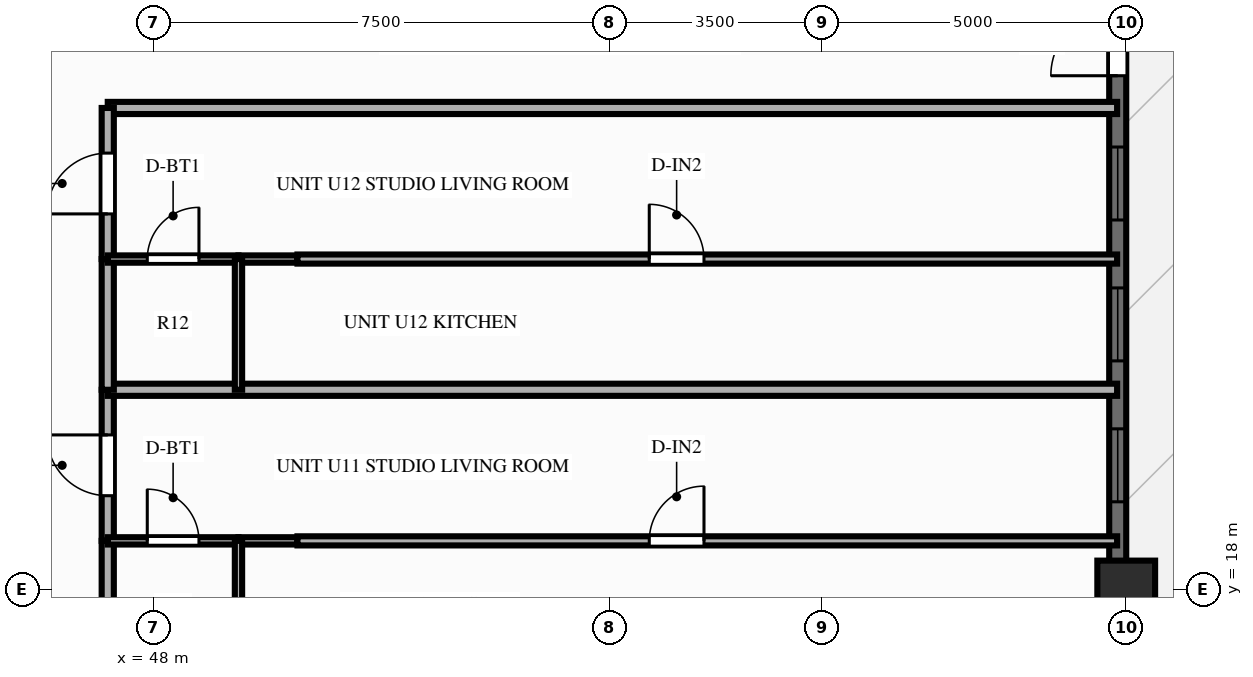
"""IFC4 building model, lengths in metres.
Left out: names, types, materials, properties, quantities, classifications, styles, units other than length and angle.
Written with IfcOpenShell. Run it as: python <this file> out.ifc"""

import sys

from ifc_helpers import new_model, si_unit, direction, frame, frame_2d, origin, origin_2d, place, context, subcontext, project, spatial, rectangle, extrude, source, transform, mapped, element, fill, save


model = new_model("IFC4")
c1 = context("Model", 3, precision=1e-05, world=origin(), true_north=direction((0.0, 1.0)))
c2 = subcontext(c1, "Body", "Model", "MODEL_VIEW")
j1 = project(units=[si_unit("LENGTHUNIT", "METRE"), si_unit("PLANEANGLEUNIT", "RADIAN")], contexts=[c1])
p1 = place(None, origin())
s1 = spatial("IfcSite", under=j1, at=p1, CompositionType="ELEMENT")
p2 = place(p1, origin())
s2 = spatial("IfcBuilding", under=s1, at=p2, CompositionType="ELEMENT")
p3 = place(p2, frame((0.0, 0.0, 122.85)))
s3 = spatial("IfcBuildingStorey", under=s2, at=p3, CompositionType="ELEMENT", Elevation=122.85)
m1 = source(origin(), c2, "Body", "SweptSolid", [
    extrude(rectangle(XDim=0.95, YDim=0.95, at=origin_2d()), origin(), (0.0, 0.0, 1.0), 3.9),
])
p4 = place(p3, frame((64.0, 18.0, 0.0), z_axis=(0.0, 0.0, 1.0), x_axis=(1.0, 0.0, 0.0)))
e1 = element("IfcColumn", 1, at=p4, inside=s3, PredefinedType="COLUMN", context=c2, shape_type="MappedRepresentation", body=[
    mapped(m1, transform((0.0, 0.0, 0.0), scale=1.0)),
])
p5 = place(p3, frame((63.86, 7.2, 0.0), z_axis=(0.0, 0.0, 1.0), x_axis=(0.0, 1.0, 0.0)))
e2 = element("IfcWall", 2, at=p5, inside=s3, PredefinedType="SOLIDWALL", context=c2, shape_type="SweptSolid", body=[
    extrude(rectangle(XDim=39.6, YDim=0.28, at=frame_2d((19.8, 0.0))), origin(), (0.0, 0.0, 1.0), 2.24),
])
p6 = place(p5, frame((0.89, 0.0, 0.25)))
e3 = element("IfcOpeningElement", 3, at=p6, cuts=e2, PredefinedType="OPENING", context=c2, shape_type="SweptSolid", body=[
    extrude(rectangle(XDim=1.2, YDim=1.5, at=frame_2d((0.6, 0.75))), frame((0.0, 0.152, 0.0), z_axis=(0.0, -1.0, 0.0), x_axis=(1.0, 0.0, 0.0)), (0.0, 0.0, 1.0), 0.304),
])
p7 = place(p5, frame((3.14, 0.0, 0.25)))
e4 = element("IfcOpeningElement", 4, at=p7, cuts=e2, PredefinedType="OPENING", context=c2, shape_type="SweptSolid", body=[
    extrude(rectangle(XDim=1.2, YDim=1.5, at=frame_2d((0.6, 0.75))), frame((0.0, 0.152, 0.0), z_axis=(0.0, -1.0, 0.0), x_axis=(1.0, 0.0, 0.0)), (0.0, 0.0, 1.0), 0.304),
])
p8 = place(p5, frame((5.458, 0.0, 0.25)))
e5 = element("IfcOpeningElement", 5, at=p8, cuts=e2, PredefinedType="OPENING", context=c2, shape_type="SweptSolid", body=[
    extrude(rectangle(XDim=1.2, YDim=1.5, at=frame_2d((0.6, 0.75))), frame((0.0, 0.152, 0.0), z_axis=(0.0, -1.0, 0.0), x_axis=(1.0, 0.0, 0.0)), (0.0, 0.0, 1.0), 0.304),
])
p9 = place(p5, frame((7.775, 0.0, 0.25)))
e6 = element("IfcOpeningElement", 6, at=p9, cuts=e2, PredefinedType="OPENING", context=c2, shape_type="SweptSolid", body=[
    extrude(rectangle(XDim=1.2, YDim=1.5, at=frame_2d((0.6, 0.75))), frame((0.0, 0.152, 0.0), z_axis=(0.0, -1.0, 0.0), x_axis=(1.0, 0.0, 0.0)), (0.0, 0.0, 1.0), 0.304),
])
p10 = place(p5, frame((12.242, 0.0, 0.25)))
e7 = element("IfcOpeningElement", 7, at=p10, cuts=e2, PredefinedType="OPENING", context=c2, shape_type="SweptSolid", body=[
    extrude(rectangle(XDim=1.2, YDim=1.5, at=frame_2d((0.6, 0.75))), frame((0.0, 0.152, 0.0), z_axis=(0.0, -1.0, 0.0), x_axis=(1.0, 0.0, 0.0)), (0.0, 0.0, 1.0), 0.304),
])
p11 = place(p5, frame((14.56, 0.0, 0.25)))
e8 = element("IfcOpeningElement", 8, at=p11, cuts=e2, PredefinedType="OPENING", context=c2, shape_type="SweptSolid", body=[
    extrude(rectangle(XDim=1.2, YDim=1.5, at=frame_2d((0.6, 0.75))), frame((0.0, 0.152, 0.0), z_axis=(0.0, -1.0, 0.0), x_axis=(1.0, 0.0, 0.0)), (0.0, 0.0, 1.0), 0.304),
])
p12 = place(p5, frame((16.877, 0.0, 0.25)))
e9 = element("IfcOpeningElement", 9, at=p12, cuts=e2, PredefinedType="OPENING", context=c2, shape_type="SweptSolid", body=[
    extrude(rectangle(XDim=1.2, YDim=1.5, at=frame_2d((0.6, 0.75))), frame((0.0, 0.152, 0.0), z_axis=(0.0, -1.0, 0.0), x_axis=(1.0, 0.0, 0.0)), (0.0, 0.0, 1.0), 0.304),
])
p13 = place(p5, frame((20.35, 0.0, 0.0), z_axis=(0.0, 0.0, 1.0), x_axis=(-1.0, 0.0, 0.0)))
e10 = element("IfcOpeningElement", 10, at=p13, cuts=e2, PredefinedType="OPENING", context=c2, shape_type="SweptSolid", body=[
    extrude(rectangle(XDim=1.1, YDim=2.15, at=frame_2d((0.55, 1.075))), frame((0.0, 0.152, 0.0), z_axis=(0.0, -1.0, 0.0), x_axis=(1.0, 0.0, 0.0)), (0.0, 0.0, 1.0), 0.304),
])
p14 = place(p5, frame((21.522, 0.0, 0.25)))
e11 = element("IfcOpeningElement", 11, at=p14, cuts=e2, PredefinedType="OPENING", context=c2, shape_type="SweptSolid", body=[
    extrude(rectangle(XDim=1.2, YDim=1.5, at=frame_2d((0.6, 0.75))), frame((0.0, 0.152, 0.0), z_axis=(0.0, -1.0, 0.0), x_axis=(1.0, 0.0, 0.0)), (0.0, 0.0, 1.0), 0.304),
])
p15 = place(p5, frame((23.84, 0.0, 0.25)))
e12 = element("IfcOpeningElement", 12, at=p15, cuts=e2, PredefinedType="OPENING", context=c2, shape_type="SweptSolid", body=[
    extrude(rectangle(XDim=1.2, YDim=1.5, at=frame_2d((0.6, 0.75))), frame((0.0, 0.152, 0.0), z_axis=(0.0, -1.0, 0.0), x_axis=(1.0, 0.0, 0.0)), (0.0, 0.0, 1.0), 0.304),
])
p16 = place(p5, frame((26.157, 0.0, 0.25)))
e13 = element("IfcOpeningElement", 13, at=p16, cuts=e2, PredefinedType="OPENING", context=c2, shape_type="SweptSolid", body=[
    extrude(rectangle(XDim=1.2, YDim=1.5, at=frame_2d((0.6, 0.75))), frame((0.0, 0.152, 0.0), z_axis=(0.0, -1.0, 0.0), x_axis=(1.0, 0.0, 0.0)), (0.0, 0.0, 1.0), 0.304),
])
p17 = place(p5, frame((30.625, 0.0, 0.25)))
e14 = element("IfcOpeningElement", 14, at=p17, cuts=e2, PredefinedType="OPENING", context=c2, shape_type="SweptSolid", body=[
    extrude(rectangle(XDim=1.2, YDim=1.5, at=frame_2d((0.6, 0.75))), frame((0.0, 0.152, 0.0), z_axis=(0.0, -1.0, 0.0), x_axis=(1.0, 0.0, 0.0)), (0.0, 0.0, 1.0), 0.304),
])
p18 = place(p5, frame((32.942, 0.0, 0.25)))
e15 = element("IfcOpeningElement", 15, at=p18, cuts=e2, PredefinedType="OPENING", context=c2, shape_type="SweptSolid", body=[
    extrude(rectangle(XDim=1.2, YDim=1.5, at=frame_2d((0.6, 0.75))), frame((0.0, 0.152, 0.0), z_axis=(0.0, -1.0, 0.0), x_axis=(1.0, 0.0, 0.0)), (0.0, 0.0, 1.0), 0.304),
])
p19 = place(p5, frame((35.26, 0.0, 0.25)))
e16 = element("IfcOpeningElement", 16, at=p19, cuts=e2, PredefinedType="OPENING", context=c2, shape_type="SweptSolid", body=[
    extrude(rectangle(XDim=1.2, YDim=1.5, at=frame_2d((0.6, 0.75))), frame((0.0, 0.152, 0.0), z_axis=(0.0, -1.0, 0.0), x_axis=(1.0, 0.0, 0.0)), (0.0, 0.0, 1.0), 0.304),
])
p20 = place(p5, frame((37.51, 0.0, 0.25)))
e17 = element("IfcOpeningElement", 17, at=p20, cuts=e2, PredefinedType="OPENING", context=c2, shape_type="SweptSolid", body=[
    extrude(rectangle(XDim=1.2, YDim=1.5, at=frame_2d((0.6, 0.75))), frame((0.0, 0.152, 0.0), z_axis=(0.0, -1.0, 0.0), x_axis=(1.0, 0.0, 0.0)), (0.0, 0.0, 1.0), 0.304),
])
p21 = place(p3, frame((47.25, 25.92, 0.0), z_axis=(0.0, 0.0, 1.0), x_axis=(1.0, 0.0, 0.0)))
e18 = element("IfcWall", 18, at=p21, inside=s3, PredefinedType="PARTITIONING", context=c2, shape_type="SweptSolid", body=[
    extrude(rectangle(XDim=16.6, YDim=0.2, at=frame_2d((8.3, 0.0))), origin(), (0.0, 0.0, 1.0), 3.56),
])
p22 = place(p3, frame((47.25, 16.65, 0.0), z_axis=(0.0, 0.0, 1.0), x_axis=(0.0, 1.0, 0.0)))
e19 = element("IfcWall", 19, at=p22, inside=s3, PredefinedType="PARTITIONING", context=c2, shape_type="SweptSolid", body=[
    extrude(rectangle(XDim=2.15, YDim=0.2, at=frame_2d((1.075, 0.0))), origin(), (0.0, 0.0, 1.0), 3.56),
])
p23 = place(p3, frame((47.25, 18.8, 0.0), z_axis=(0.0, 0.0, 1.0), x_axis=(0.0, 1.0, 0.0)))
e20 = element("IfcWall", 20, at=p23, inside=s3, PredefinedType="PARTITIONING", context=c2, shape_type="SweptSolid", body=[
    extrude(rectangle(XDim=2.485, YDim=0.2, at=frame_2d((1.242, 0.0))), origin(), (0.0, 0.0, 1.0), 3.56),
])
p24 = place(p23, frame((0.742, 0.0, 0.0)))
e21 = element("IfcOpeningElement", 21, at=p24, cuts=e20, PredefinedType="OPENING", context=c2, shape_type="SweptSolid", body=[
    extrude(rectangle(XDim=1.0, YDim=2.15, at=frame_2d((0.5, 1.075))), frame((0.0, 0.112, 0.0), z_axis=(0.0, -1.0, 0.0), x_axis=(1.0, 0.0, 0.0)), (0.0, 0.0, 1.0), 0.224),
])
p25 = place(p3, frame((47.25, 18.8, 0.0), z_axis=(0.0, 0.0, 1.0), x_axis=(1.0, 0.0, 0.0)))
e22 = element("IfcWall", 22, at=p25, inside=s3, PredefinedType="PARTITIONING", context=c2, shape_type="SweptSolid", body=[
    extrude(rectangle(XDim=2.15, YDim=0.12, at=frame_2d((1.075, 0.0))), origin(), (0.0, 0.0, 1.0), 3.56),
])
p26 = place(p25, frame((0.65, 0.0, 0.0)))
e23 = element("IfcOpeningElement", 23, at=p26, cuts=e22, PredefinedType="OPENING", context=c2, shape_type="SweptSolid", body=[
    extrude(rectangle(XDim=0.85, YDim=2.05, at=frame_2d((0.425, 1.025))), frame((0.0, 0.072, 0.0), z_axis=(0.0, -1.0, 0.0), x_axis=(1.0, 0.0, 0.0)), (0.0, 0.0, 1.0), 0.144),
])
p27 = place(p3, frame((49.4, 18.8, 0.0), z_axis=(0.0, 0.0, 1.0), x_axis=(1.0, 0.0, 0.0)))
e24 = element("IfcWall", 24, at=p27, inside=s3, PredefinedType="PARTITIONING", context=c2, shape_type="SweptSolid", body=[
    extrude(rectangle(XDim=0.97, YDim=0.12, at=frame_2d((0.485, 0.0))), origin(), (0.0, 0.0, 1.0), 3.56),
])
p28 = place(p3, frame((49.4, 16.65, 0.0), z_axis=(0.0, 0.0, 1.0), x_axis=(0.0, 1.0, 0.0)))
e25 = element("IfcWall", 25, at=p28, inside=s3, PredefinedType="PARTITIONING", context=c2, shape_type="SweptSolid", body=[
    extrude(rectangle(XDim=2.15, YDim=0.12, at=frame_2d((1.075, 0.0))), origin(), (0.0, 0.0, 1.0), 3.56),
])
p29 = place(p3, frame((50.37, 18.8, 0.0), z_axis=(0.0, 0.0, 1.0), x_axis=(1.0, 0.0, 0.0)))
e26 = element("IfcWall", 26, at=p29, inside=s3, PredefinedType="PARTITIONING", context=c2, shape_type="SweptSolid", body=[
    extrude(rectangle(XDim=13.48, YDim=0.15, at=frame_2d((6.74, 0.0))), origin(), (0.0, 0.0, 1.0), 3.56),
])
p30 = place(p29, frame((5.786, 0.0, 0.0)))
e27 = element("IfcOpeningElement", 27, at=p30, cuts=e26, PredefinedType="OPENING", context=c2, shape_type="SweptSolid", body=[
    extrude(rectangle(XDim=0.9, YDim=2.1, at=frame_2d((0.45, 1.05))), frame((0.0, 0.087, 0.0), z_axis=(0.0, -1.0, 0.0), x_axis=(1.0, 0.0, 0.0)), (0.0, 0.0, 1.0), 0.174),
])
p31 = place(p3, frame((47.25, 21.285, 0.0), z_axis=(0.0, 0.0, 1.0), x_axis=(1.0, 0.0, 0.0)))
e28 = element("IfcWall", 28, at=p31, inside=s3, PredefinedType="PARTITIONING", context=c2, shape_type="SweptSolid", body=[
    extrude(rectangle(XDim=16.6, YDim=0.2, at=frame_2d((8.3, 0.0))), origin(), (0.0, 0.0, 1.0), 3.56),
])
p32 = place(p3, frame((47.25, 21.285, 0.0), z_axis=(0.0, 0.0, 1.0), x_axis=(0.0, 1.0, 0.0)))
e29 = element("IfcWall", 29, at=p32, inside=s3, PredefinedType="PARTITIONING", context=c2, shape_type="SweptSolid", body=[
    extrude(rectangle(XDim=2.15, YDim=0.2, at=frame_2d((1.075, 0.0))), origin(), (0.0, 0.0, 1.0), 3.56),
])
p33 = place(p3, frame((47.25, 23.435, 0.0), z_axis=(0.0, 0.0, 1.0), x_axis=(0.0, 1.0, 0.0)))
e30 = element("IfcWall", 30, at=p33, inside=s3, PredefinedType="PARTITIONING", context=c2, shape_type="SweptSolid", body=[
    extrude(rectangle(XDim=2.485, YDim=0.2, at=frame_2d((1.242, 0.0))), origin(), (0.0, 0.0, 1.0), 3.56),
])
p34 = place(p33, frame((0.742, 0.0, 0.0)))
e31 = element("IfcOpeningElement", 31, at=p34, cuts=e30, PredefinedType="OPENING", context=c2, shape_type="SweptSolid", body=[
    extrude(rectangle(XDim=1.0, YDim=2.15, at=frame_2d((0.5, 1.075))), frame((0.0, 0.112, 0.0), z_axis=(0.0, -1.0, 0.0), x_axis=(1.0, 0.0, 0.0)), (0.0, 0.0, 1.0), 0.224),
])
p35 = place(p3, frame((47.25, 23.435, 0.0), z_axis=(0.0, 0.0, 1.0), x_axis=(1.0, 0.0, 0.0)))
e32 = element("IfcWall", 32, at=p35, inside=s3, PredefinedType="PARTITIONING", context=c2, shape_type="SweptSolid", body=[
    extrude(rectangle(XDim=2.15, YDim=0.12, at=frame_2d((1.075, 0.0))), origin(), (0.0, 0.0, 1.0), 3.56),
])
p36 = place(p35, frame((0.65, 0.0, 0.0)))
e33 = element("IfcOpeningElement", 33, at=p36, cuts=e32, PredefinedType="OPENING", context=c2, shape_type="SweptSolid", body=[
    extrude(rectangle(XDim=0.85, YDim=2.05, at=frame_2d((0.425, 1.025))), frame((0.0, 0.072, 0.0), z_axis=(0.0, -1.0, 0.0), x_axis=(1.0, 0.0, 0.0)), (0.0, 0.0, 1.0), 0.144),
])
p37 = place(p3, frame((49.4, 23.435, 0.0), z_axis=(0.0, 0.0, 1.0), x_axis=(1.0, 0.0, 0.0)))
e34 = element("IfcWall", 34, at=p37, inside=s3, PredefinedType="PARTITIONING", context=c2, shape_type="SweptSolid", body=[
    extrude(rectangle(XDim=0.97, YDim=0.12, at=frame_2d((0.485, 0.0))), origin(), (0.0, 0.0, 1.0), 3.56),
])
p38 = place(p3, frame((49.4, 21.285, 0.0), z_axis=(0.0, 0.0, 1.0), x_axis=(0.0, 1.0, 0.0)))
e35 = element("IfcWall", 35, at=p38, inside=s3, PredefinedType="PARTITIONING", context=c2, shape_type="SweptSolid", body=[
    extrude(rectangle(XDim=2.15, YDim=0.12, at=frame_2d((1.075, 0.0))), origin(), (0.0, 0.0, 1.0), 3.56),
])
p39 = place(p3, frame((50.37, 23.435, 0.0), z_axis=(0.0, 0.0, 1.0), x_axis=(1.0, 0.0, 0.0)))
e36 = element("IfcWall", 36, at=p39, inside=s3, PredefinedType="PARTITIONING", context=c2, shape_type="SweptSolid", body=[
    extrude(rectangle(XDim=13.48, YDim=0.15, at=frame_2d((6.74, 0.0))), origin(), (0.0, 0.0, 1.0), 3.56),
])
p40 = place(p39, frame((5.786, 0.0, 0.0)))
e37 = element("IfcOpeningElement", 37, at=p40, cuts=e36, PredefinedType="OPENING", context=c2, shape_type="SweptSolid", body=[
    extrude(rectangle(XDim=0.9, YDim=2.1, at=frame_2d((0.45, 1.05))), frame((0.0, 0.087, 0.0), z_axis=(0.0, -1.0, 0.0), x_axis=(1.0, 0.0, 0.0)), (0.0, 0.0, 1.0), 0.174),
])
m2 = source(origin(), c2, "Body", "SweptSolid", [
    extrude(rectangle(XDim=1.2, YDim=1.5, at=frame_2d((0.6, 0.75))), frame((0.0, 0.03, 0.0), z_axis=(0.0, -1.0, 0.0), x_axis=(1.0, 0.0, 0.0)), (0.0, 0.0, 1.0), 0.06),
])
p41 = place(p10, origin())
e38 = element("IfcWindow", 38, at=p41, inside=s3, PartitioningType="SINGLE_PANEL", PredefinedType="WINDOW", context=c2, shape_type="MappedRepresentation", body=[
    mapped(m2, transform((0.0, 0.0, 0.0), scale=1.0)),
])
fill(e7, e38)
p42 = place(p11, origin())
e39 = element("IfcWindow", 39, at=p42, inside=s3, PartitioningType="SINGLE_PANEL", PredefinedType="WINDOW", context=c2, shape_type="MappedRepresentation", body=[
    mapped(m2, transform((0.0, 0.0, 0.0), scale=1.0)),
])
fill(e8, e39)
p43 = place(p12, origin())
e40 = element("IfcWindow", 40, at=p43, inside=s3, PartitioningType="SINGLE_PANEL", PredefinedType="WINDOW", context=c2, shape_type="MappedRepresentation", body=[
    mapped(m2, transform((0.0, 0.0, 0.0), scale=1.0)),
])
fill(e9, e40)
m3 = source(origin(), c2, "Body", "SweptSolid", [
    extrude(rectangle(XDim=1.1, YDim=2.15, at=frame_2d((0.55, 1.075))), frame((0.0, 0.025, 0.0), z_axis=(0.0, -1.0, 0.0), x_axis=(1.0, 0.0, 0.0)), (0.0, 0.0, 1.0), 0.05),
])
p44 = place(p13, origin())
e41 = element("IfcDoor", 41, at=p44, inside=s3, OperationType="SINGLE_SWING_RIGHT", PredefinedType="DOOR", context=c2, shape_type="MappedRepresentation", body=[
    mapped(m3, transform((0.0, 0.0, 0.0), scale=1.0)),
])
fill(e10, e41)
m4 = source(origin(), c2, "Body", "SweptSolid", [
    extrude(rectangle(XDim=1.0, YDim=2.15, at=frame_2d((0.5, 1.075))), frame((0.0, 0.025, 0.0), z_axis=(0.0, -1.0, 0.0), x_axis=(1.0, 0.0, 0.0)), (0.0, 0.0, 1.0), 0.05),
])
p45 = place(p24, origin())
e42 = element("IfcDoor", 42, at=p45, inside=s3, OperationType="SINGLE_SWING_RIGHT", PredefinedType="DOOR", context=c2, shape_type="MappedRepresentation", body=[
    mapped(m4, transform((0.0, 0.0, 0.0), scale=1.0)),
])
fill(e21, e42)
m5 = source(origin(), c2, "Body", "SweptSolid", [
    extrude(rectangle(XDim=0.85, YDim=2.05, at=frame_2d((0.425, 1.025))), frame((0.0, 0.025, 0.0), z_axis=(0.0, -1.0, 0.0), x_axis=(1.0, 0.0, 0.0)), (0.0, 0.0, 1.0), 0.05),
])
p46 = place(p26, origin())
e43 = element("IfcDoor", 43, at=p46, inside=s3, OperationType="SINGLE_SWING_LEFT", PredefinedType="DOOR", context=c2, shape_type="MappedRepresentation", body=[
    mapped(m5, transform((0.0, 0.0, 0.0), scale=1.0)),
])
fill(e23, e43)
m6 = source(origin(), c2, "Body", "SweptSolid", [
    extrude(rectangle(XDim=0.9, YDim=2.1, at=frame_2d((0.45, 1.05))), frame((0.0, 0.025, 0.0), z_axis=(0.0, -1.0, 0.0), x_axis=(1.0, 0.0, 0.0)), (0.0, 0.0, 1.0), 0.05),
])
p47 = place(p30, origin())
e44 = element("IfcDoor", 44, at=p47, inside=s3, OperationType="SINGLE_SWING_RIGHT", PredefinedType="DOOR", context=c2, shape_type="MappedRepresentation", body=[
    mapped(m6, transform((0.0, 0.0, 0.0), scale=1.0)),
])
fill(e27, e44)
p48 = place(p34, origin())
e45 = element("IfcDoor", 45, at=p48, inside=s3, OperationType="SINGLE_SWING_LEFT", PredefinedType="DOOR", context=c2, shape_type="MappedRepresentation", body=[
    mapped(m4, transform((0.0, 0.0, 0.0), scale=1.0)),
])
fill(e31, e45)
p49 = place(p36, origin())
e46 = element("IfcDoor", 46, at=p49, inside=s3, OperationType="SINGLE_SWING_RIGHT", PredefinedType="DOOR", context=c2, shape_type="MappedRepresentation", body=[
    mapped(m5, transform((0.0, 0.0, 0.0), scale=1.0)),
])
fill(e33, e46)
p50 = place(p40, origin())
e47 = element("IfcDoor", 47, at=p50, inside=s3, OperationType="SINGLE_SWING_LEFT", PredefinedType="DOOR", context=c2, shape_type="MappedRepresentation", body=[
    mapped(m6, transform((0.0, 0.0, 0.0), scale=1.0)),
])
fill(e37, e47)
save(model, sys.argv[1])
